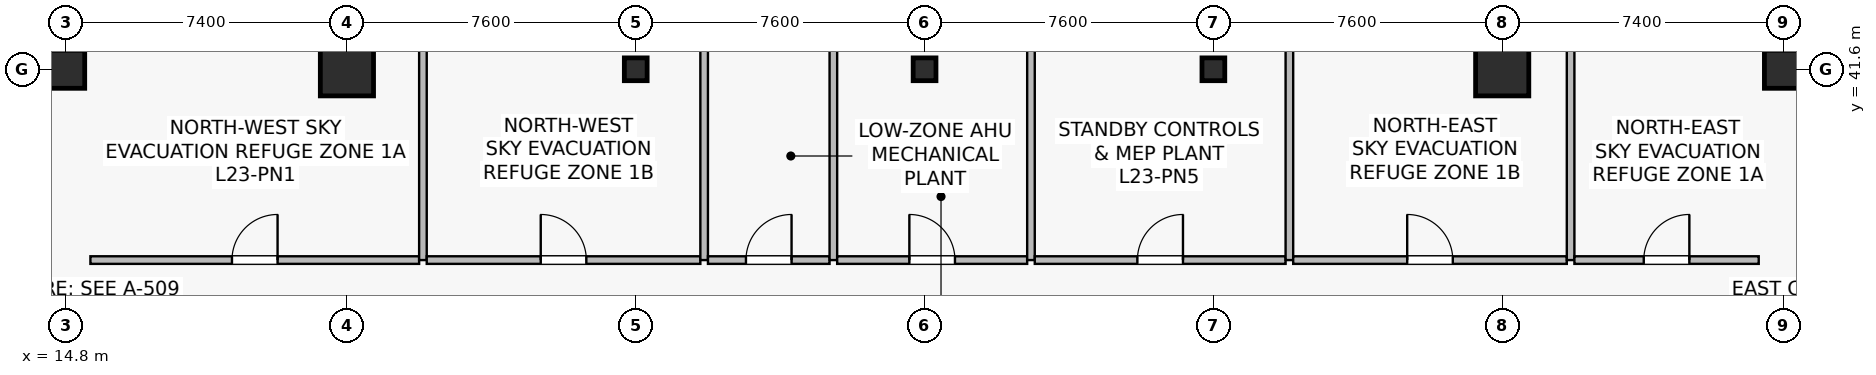
"""IFC4 building model, lengths in metres.
Left out: names, types, materials, properties, quantities, classifications, styles, units other than length and angle.
Written with IfcOpenShell. Run it as: python <this file> out.ifc"""

import sys

from ifc_helpers import new_model, si_unit, direction, frame, frame_2d, origin, origin_2d, place, context, subcontext, project, spatial, rectangle, hollow_rectangle, extrude, source, transform, mapped, element, fill, save


model = new_model("IFC4")
c1 = context("Model", 3, precision=1e-05, world=origin(), true_north=direction((0.0, 1.0)))
c2 = subcontext(c1, "Body", "Model", "MODEL_VIEW")
j1 = project(units=[si_unit("LENGTHUNIT", "METRE"), si_unit("PLANEANGLEUNIT", "RADIAN")], contexts=[c1])
p1 = place(None, origin())
s1 = spatial("IfcSite", under=j1, at=p1, CompositionType="ELEMENT")
p2 = place(p1, origin())
s2 = spatial("IfcBuilding", under=s1, at=p2, CompositionType="ELEMENT")
p3 = place(p2, frame((0.0, 0.0, 94.9)))
s3 = spatial("IfcBuildingStorey", under=s2, at=p3, CompositionType="ELEMENT", Elevation=94.9)
m1 = source(origin(), c2, "Body", "SweptSolid", [
    extrude(rectangle(XDim=1.0, YDim=1.0, at=origin_2d()), origin(), (0.0, 0.0, 1.0), 5.4),
])
p4 = place(p3, frame((14.8, 41.6, 0.0), z_axis=(0.0, 0.0, 1.0), x_axis=(1.0, 0.0, 0.0)))
e1 = element("IfcColumn", 1, at=p4, inside=s3, PredefinedType="COLUMN", context=c2, shape_type="MappedRepresentation", body=[
    mapped(m1, transform((0.0, 0.0, 0.0), scale=1.0)),
])
m2 = source(origin(), c2, "Body", "SweptSolid", [
    extrude(rectangle(XDim=1.4, YDim=1.4, at=origin_2d()), origin(), (0.0, 0.0, 1.0), 5.4),
])
for number, where, z_axis, x_axis in (
    (2, (22.2, 41.6, 0.0), (0.0, 0.0, 1.0), (1.0, 0.0, 0.0)),
    (3, (52.6, 41.6, 0.0), (0.0, 0.0, 1.0), (1.0, 0.0, 0.0)),
):
    element("IfcColumn", number, at=place(p3, frame(where, z_axis=z_axis, x_axis=x_axis)), inside=s3, PredefinedType="COLUMN", context=c2, shape_type="MappedRepresentation", body=[
        mapped(m2, transform((0.0, 0.0, 0.0), scale=1.0)),
    ])
p5 = place(p3, frame((60.0, 41.6, 0.0), z_axis=(0.0, 0.0, 1.0), x_axis=(1.0, 0.0, 0.0)))
e4 = element("IfcColumn", 4, at=p5, inside=s3, PredefinedType="COLUMN", context=c2, shape_type="MappedRepresentation", body=[
    mapped(m1, transform((0.0, 0.0, 0.0), scale=1.0)),
])
m3 = source(origin(), c2, "Body", "SweptSolid", [
    extrude(hollow_rectangle(XDim=0.6, YDim=0.6, WallThickness=0.028, at=origin_2d()), origin(), (0.0, 0.0, 1.0), 5.4),
])
for number, where, z_axis, x_axis in (
    (5, (29.8, 41.6, 0.0), (0.0, 0.0, 1.0), (1.0, 0.0, 0.0)),
    (6, (37.4, 41.6, 0.0), (0.0, 0.0, 1.0), (1.0, 0.0, 0.0)),
    (7, (45.0, 41.6, 0.0), (0.0, 0.0, 1.0), (1.0, 0.0, 0.0)),
):
    element("IfcColumn", number, at=place(p3, frame(where, z_axis=z_axis, x_axis=x_axis)), inside=s3, PredefinedType="COLUMN", context=c2, shape_type="MappedRepresentation", body=[
        mapped(m3, transform((0.0, 0.0, 0.0), scale=1.0)),
    ])
p6 = place(p3, frame((15.45, 36.58, 0.0), z_axis=(0.0, 0.0, 1.0), x_axis=(1.0, 0.0, 0.0)))
e8 = element("IfcWall", 8, at=p6, inside=s3, PredefinedType="SOLIDWALL", context=c2, shape_type="SweptSolid", body=[
    extrude(rectangle(XDim=8.65, YDim=0.2, at=frame_2d((4.325, 0.0))), origin(), (0.0, 0.0, 1.0), 4.425),
])
p7 = place(p6, frame((3.725, 0.0, 0.0)))
e9 = element("IfcOpeningElement", 9, at=p7, cuts=e8, PredefinedType="OPENING", context=c2, shape_type="SweptSolid", body=[
    extrude(rectangle(XDim=1.2, YDim=2.16, at=frame_2d((0.6, 1.08))), frame((0.0, 0.11, 0.0), z_axis=(0.0, -1.0, 0.0), x_axis=(1.0, 0.0, 0.0)), (0.0, 0.0, 1.0), 0.22),
])
p8 = place(p3, frame((24.2, 36.58, 0.0), z_axis=(0.0, 0.0, 1.0), x_axis=(0.0, 1.0, 0.0)))
e10 = element("IfcWall", 10, at=p8, inside=s3, PredefinedType="SOLIDWALL", context=c2, shape_type="SweptSolid", body=[
    extrude(rectangle(XDim=11.91, YDim=0.2, at=frame_2d((5.955, 0.0))), origin(), (0.0, 0.0, 1.0), 4.325),
])
p9 = place(p3, frame((24.3, 36.58, 0.0), z_axis=(0.0, 0.0, 1.0), x_axis=(1.0, 0.0, 0.0)))
e11 = element("IfcWall", 11, at=p9, inside=s3, PredefinedType="SOLIDWALL", context=c2, shape_type="SweptSolid", body=[
    extrude(rectangle(XDim=7.2, YDim=0.2, at=frame_2d((3.6, 0.0))), origin(), (0.0, 0.0, 1.0), 4.425),
])
p10 = place(p9, frame((3.0, 0.0, 0.0)))
e12 = element("IfcOpeningElement", 12, at=p10, cuts=e11, PredefinedType="OPENING", context=c2, shape_type="SweptSolid", body=[
    extrude(rectangle(XDim=1.2, YDim=2.16, at=frame_2d((0.6, 1.08))), frame((0.0, 0.11, 0.0), z_axis=(0.0, -1.0, 0.0), x_axis=(1.0, 0.0, 0.0)), (0.0, 0.0, 1.0), 0.22),
])
p11 = place(p3, frame((31.6, 36.58, 0.0), z_axis=(0.0, 0.0, 1.0), x_axis=(0.0, 1.0, 0.0)))
e13 = element("IfcWall", 13, at=p11, inside=s3, PredefinedType="SOLIDWALL", context=c2, shape_type="SweptSolid", body=[
    extrude(rectangle(XDim=11.91, YDim=0.2, at=frame_2d((5.955, 0.0))), origin(), (0.0, 0.0, 1.0), 4.325),
])
p12 = place(p3, frame((31.7, 36.58, 0.0), z_axis=(0.0, 0.0, 1.0), x_axis=(1.0, 0.0, 0.0)))
e14 = element("IfcWall", 14, at=p12, inside=s3, PredefinedType="SOLIDWALL", context=c2, shape_type="SweptSolid", body=[
    extrude(rectangle(XDim=3.2, YDim=0.2, at=frame_2d((1.6, 0.0))), origin(), (0.0, 0.0, 1.0), 4.725),
])
p13 = place(p12, frame((1.0, 0.0, 0.0)))
e15 = element("IfcOpeningElement", 15, at=p13, cuts=e14, PredefinedType="OPENING", context=c2, shape_type="SweptSolid", body=[
    extrude(rectangle(XDim=1.2, YDim=2.16, at=frame_2d((0.6, 1.08))), frame((0.0, 0.11, 0.0), z_axis=(0.0, -1.0, 0.0), x_axis=(1.0, 0.0, 0.0)), (0.0, 0.0, 1.0), 0.22),
])
p14 = place(p3, frame((35.0, 36.58, 0.0), z_axis=(0.0, 0.0, 1.0), x_axis=(0.0, 1.0, 0.0)))
e16 = element("IfcWall", 16, at=p14, inside=s3, PredefinedType="SOLIDWALL", context=c2, shape_type="SweptSolid", body=[
    extrude(rectangle(XDim=11.91, YDim=0.2, at=frame_2d((5.955, 0.0))), origin(), (0.0, 0.0, 1.0), 4.325),
])
p15 = place(p3, frame((35.1, 36.58, 0.0), z_axis=(0.0, 0.0, 1.0), x_axis=(1.0, 0.0, 0.0)))
e17 = element("IfcWall", 17, at=p15, inside=s3, PredefinedType="SOLIDWALL", context=c2, shape_type="SweptSolid", body=[
    extrude(rectangle(XDim=5.0, YDim=0.2, at=frame_2d((2.5, 0.0))), origin(), (0.0, 0.0, 1.0), 4.425),
])
p16 = place(p15, frame((1.9, 0.0, 0.0)))
e18 = element("IfcOpeningElement", 18, at=p16, cuts=e17, PredefinedType="OPENING", context=c2, shape_type="SweptSolid", body=[
    extrude(rectangle(XDim=1.2, YDim=2.16, at=frame_2d((0.6, 1.08))), frame((0.0, 0.11, 0.0), z_axis=(0.0, -1.0, 0.0), x_axis=(1.0, 0.0, 0.0)), (0.0, 0.0, 1.0), 0.22),
])
p17 = place(p3, frame((40.2, 36.58, 0.0), z_axis=(0.0, 0.0, 1.0), x_axis=(0.0, 1.0, 0.0)))
e19 = element("IfcWall", 19, at=p17, inside=s3, PredefinedType="SOLIDWALL", context=c2, shape_type="SweptSolid", body=[
    extrude(rectangle(XDim=11.91, YDim=0.2, at=frame_2d((5.955, 0.0))), origin(), (0.0, 0.0, 1.0), 4.325),
])
p18 = place(p3, frame((40.3, 36.58, 0.0), z_axis=(0.0, 0.0, 1.0), x_axis=(1.0, 0.0, 0.0)))
e20 = element("IfcWall", 20, at=p18, inside=s3, PredefinedType="SOLIDWALL", context=c2, shape_type="SweptSolid", body=[
    extrude(rectangle(XDim=6.6, YDim=0.2, at=frame_2d((3.3, 0.0))), origin(), (0.0, 0.0, 1.0), 4.425),
])
p19 = place(p18, frame((2.7, 0.0, 0.0)))
e21 = element("IfcOpeningElement", 21, at=p19, cuts=e20, PredefinedType="OPENING", context=c2, shape_type="SweptSolid", body=[
    extrude(rectangle(XDim=1.2, YDim=2.16, at=frame_2d((0.6, 1.08))), frame((0.0, 0.11, 0.0), z_axis=(0.0, -1.0, 0.0), x_axis=(1.0, 0.0, 0.0)), (0.0, 0.0, 1.0), 0.22),
])
p20 = place(p3, frame((47.0, 36.58, 0.0), z_axis=(0.0, 0.0, 1.0), x_axis=(0.0, 1.0, 0.0)))
e22 = element("IfcWall", 22, at=p20, inside=s3, PredefinedType="SOLIDWALL", context=c2, shape_type="SweptSolid", body=[
    extrude(rectangle(XDim=11.91, YDim=0.2, at=frame_2d((5.955, 0.0))), origin(), (0.0, 0.0, 1.0), 4.325),
])
p21 = place(p3, frame((47.1, 36.58, 0.0), z_axis=(0.0, 0.0, 1.0), x_axis=(1.0, 0.0, 0.0)))
e23 = element("IfcWall", 23, at=p21, inside=s3, PredefinedType="SOLIDWALL", context=c2, shape_type="SweptSolid", body=[
    extrude(rectangle(XDim=7.2, YDim=0.2, at=frame_2d((3.6, 0.0))), origin(), (0.0, 0.0, 1.0), 4.425),
])
p22 = place(p21, frame((3.0, 0.0, 0.0)))
e24 = element("IfcOpeningElement", 24, at=p22, cuts=e23, PredefinedType="OPENING", context=c2, shape_type="SweptSolid", body=[
    extrude(rectangle(XDim=1.2, YDim=2.16, at=frame_2d((0.6, 1.08))), frame((0.0, 0.11, 0.0), z_axis=(0.0, -1.0, 0.0), x_axis=(1.0, 0.0, 0.0)), (0.0, 0.0, 1.0), 0.22),
])
p23 = place(p3, frame((54.4, 36.58, 0.0), z_axis=(0.0, 0.0, 1.0), x_axis=(0.0, 1.0, 0.0)))
e25 = element("IfcWall", 25, at=p23, inside=s3, PredefinedType="SOLIDWALL", context=c2, shape_type="SweptSolid", body=[
    extrude(rectangle(XDim=11.91, YDim=0.2, at=frame_2d((5.955, 0.0))), origin(), (0.0, 0.0, 1.0), 4.225),
])
p24 = place(p3, frame((54.5, 36.58, 0.0), z_axis=(0.0, 0.0, 1.0), x_axis=(1.0, 0.0, 0.0)))
e26 = element("IfcWall", 26, at=p24, inside=s3, PredefinedType="SOLIDWALL", context=c2, shape_type="SweptSolid", body=[
    extrude(rectangle(XDim=4.85, YDim=0.2, at=frame_2d((2.425, 0.0))), origin(), (0.0, 0.0, 1.0), 4.725),
])
p25 = place(p24, frame((1.825, 0.0, 0.0)))
e27 = element("IfcOpeningElement", 27, at=p25, cuts=e26, PredefinedType="OPENING", context=c2, shape_type="SweptSolid", body=[
    extrude(rectangle(XDim=1.2, YDim=2.16, at=frame_2d((0.6, 1.08))), frame((0.0, 0.11, 0.0), z_axis=(0.0, -1.0, 0.0), x_axis=(1.0, 0.0, 0.0)), (0.0, 0.0, 1.0), 0.22),
])
m4 = source(origin(), c2, "Body", "SweptSolid", [
    extrude(rectangle(XDim=1.2, YDim=2.16, at=frame_2d((0.6, 1.08))), frame((0.0, 0.025, 0.0), z_axis=(0.0, -1.0, 0.0), x_axis=(1.0, 0.0, 0.0)), (0.0, 0.0, 1.0), 0.05),
])
p26 = place(p7, origin())
e28 = element("IfcDoor", 28, at=p26, inside=s3, OperationType="SINGLE_SWING_RIGHT", PredefinedType="DOOR", context=c2, shape_type="MappedRepresentation", body=[
    mapped(m4, transform((0.0, 0.0, 0.0), scale=1.0)),
])
fill(e9, e28)
p27 = place(p10, origin())
e29 = element("IfcDoor", 29, at=p27, inside=s3, OperationType="SINGLE_SWING_LEFT", PredefinedType="DOOR", context=c2, shape_type="MappedRepresentation", body=[
    mapped(m4, transform((0.0, 0.0, 0.0), scale=1.0)),
])
fill(e12, e29)
p28 = place(p13, origin())
e30 = element("IfcDoor", 30, at=p28, inside=s3, OperationType="SINGLE_SWING_RIGHT", PredefinedType="DOOR", context=c2, shape_type="MappedRepresentation", body=[
    mapped(m4, transform((0.0, 0.0, 0.0), scale=1.0)),
])
fill(e15, e30)
p29 = place(p16, origin())
e31 = element("IfcDoor", 31, at=p29, inside=s3, OperationType="SINGLE_SWING_LEFT", PredefinedType="DOOR", context=c2, shape_type="MappedRepresentation", body=[
    mapped(m4, transform((0.0, 0.0, 0.0), scale=1.0)),
])
fill(e18, e31)
p30 = place(p19, origin())
e32 = element("IfcDoor", 32, at=p30, inside=s3, OperationType="SINGLE_SWING_RIGHT", PredefinedType="DOOR", context=c2, shape_type="MappedRepresentation", body=[
    mapped(m4, transform((0.0, 0.0, 0.0), scale=1.0)),
])
fill(e21, e32)
p31 = place(p22, origin())
e33 = element("IfcDoor", 33, at=p31, inside=s3, OperationType="SINGLE_SWING_LEFT", PredefinedType="DOOR", context=c2, shape_type="MappedRepresentation", body=[
    mapped(m4, transform((0.0, 0.0, 0.0), scale=1.0)),
])
fill(e24, e33)
p32 = place(p25, origin())
e34 = element("IfcDoor", 34, at=p32, inside=s3, OperationType="SINGLE_SWING_RIGHT", PredefinedType="DOOR", context=c2, shape_type="MappedRepresentation", body=[
    mapped(m4, transform((0.0, 0.0, 0.0), scale=1.0)),
])
fill(e27, e34)
save(model, sys.argv[1])
